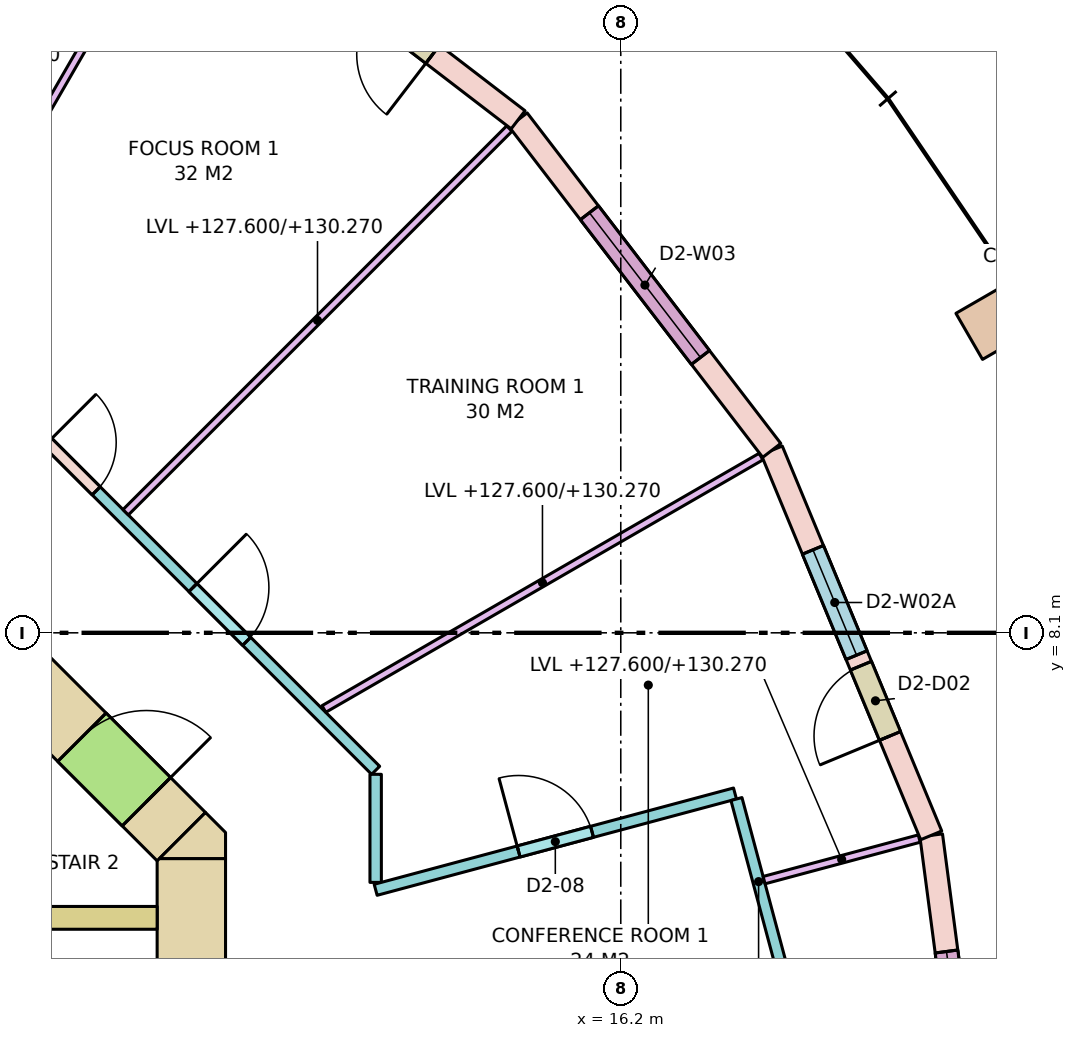
"""IFC4 building model, lengths in metres.
Left out: names, types, materials, properties, quantities, classifications, styles, units other than length and angle.
Written with IfcOpenShell. Run it as: python <this file> out.ifc"""

import sys

from ifc_helpers import new_model, si_unit, direction, frame, frame_2d, origin, origin_2d, place, context, subcontext, project, spatial, polyline, rectangle, outline, extrude, element, fill, save


model = new_model("IFC4")
c1 = context("Model", 3, precision=1e-05, world=origin(), true_north=direction((0.0, 1.0)))
c2 = subcontext(c1, "Body", "Model", "MODEL_VIEW")
j1 = project(units=[si_unit("LENGTHUNIT", "METRE"), si_unit("PLANEANGLEUNIT", "RADIAN")], contexts=[c1])
p1 = place(None, origin())
s1 = spatial("IfcSite", under=j1, at=p1, CompositionType="ELEMENT")
p2 = place(p1, origin())
s2 = spatial("IfcBuilding", under=s1, at=p2, CompositionType="ELEMENT")
p3 = place(p2, frame((0.0, 0.0, 127.6)))
s3 = spatial("IfcBuildingStorey", under=s2, at=p3, CompositionType="ELEMENT", Elevation=127.6)
p4 = place(p3, frame((21.218, 12.25, 0.0), z_axis=(0.0, 0.0, 1.0), x_axis=(-0.5, 0.866025403784, 0.0)))
e1 = element("IfcColumn", 1, at=p4, inside=s3, PredefinedType="COLUMN", context=c2, shape_type="SweptSolid", body=[
    extrude(rectangle(XDim=0.7, YDim=1.0, at=origin_2d()), origin(), (0.0, 0.0, 1.0), 3.8),
])
p5 = place(p3, frame((10.55, -5.13, -0.28), z_axis=(0.0, 0.0, 1.0), x_axis=(0.0, 1.0, 0.0)))
e2 = element("IfcWall", 2, at=p5, inside=s3, PredefinedType="SHEAR", context=c2, shape_type="SweptSolid", body=[
    extrude(rectangle(XDim=10.26, YDim=0.9, at=frame_2d((5.13, 0.0))), origin(), (0.0, 0.0, 1.0), 3.8),
])
p6 = place(p5, frame((4.13, 0.0, 0.28)))
e3 = element("IfcOpeningElement", 3, at=p6, cuts=e2, PredefinedType="OPENING", context=c2, shape_type="SweptSolid", body=[
    extrude(rectangle(XDim=2.0, YDim=2.1, at=frame_2d((1.0, 1.05))), frame((0.0, 0.46, 0.0), z_axis=(0.0, -1.0, 0.0), x_axis=(1.0, 0.0, 0.0)), (0.0, 0.0, 1.0), 0.92),
])
p7 = place(p3, frame((7.418, 8.418, -0.28), z_axis=(0.0, 0.0, 1.0), x_axis=(0.707106781187, -0.707106781187, 0.0)))
e4 = element("IfcWall", 4, at=p7, inside=s3, PredefinedType="SHEAR", context=c2, shape_type="SweptSolid", body=[
    extrude(rectangle(XDim=4.243, YDim=0.9, at=frame_2d((2.121, 0.0))), origin(), (0.0, 0.0, 1.0), 3.8),
])
p8 = place(p7, frame((2.393, 0.0, 0.28)))
e5 = element("IfcOpeningElement", 5, at=p8, cuts=e4, PredefinedType="OPENING", context=c2, shape_type="SweptSolid", body=[
    extrude(rectangle(XDim=1.2, YDim=2.1, at=frame_2d((0.6, 1.05))), frame((0.0, 0.46, 0.0), z_axis=(0.0, -1.0, 0.0), x_axis=(1.0, 0.0, 0.0)), (0.0, 0.0, 1.0), 0.92),
])
p9 = place(p3, frame((0.0, 0.0, -0.28)))
e6 = element("IfcWall", 6, at=p9, inside=s3, PredefinedType="SHEAR", context=c2, shape_type="SweptSolid", body=[
    extrude(outline(polyline([(11.0, 5.473), (11.0, 5.13), (10.13, 5.13), (10.736, 5.736), (11.0, 5.473)])), origin(), (0.0, 0.0, 1.0), 3.8),
])
p10 = place(p3, frame((2.0, 4.35, 0.0), z_axis=(0.0, 0.0, 1.0), x_axis=(1.0, 0.0, 0.0)))
e7 = element("IfcWall", 7, at=p10, inside=s3, PredefinedType="SOLIDWALL", context=c2, shape_type="SweptSolid", body=[
    extrude(rectangle(XDim=8.1, YDim=0.3, at=frame_2d((4.05, 0.0))), origin(), (0.0, 0.0, 1.0), 3.52),
])
p11 = place(p3, frame((21.0, 0.0, 0.0), z_axis=(0.0, 0.0, 1.0), x_axis=(-0.130527087244, 0.991444743541, 0.0)))
e8 = element("IfcWall", 8, at=p11, inside=s3, PredefinedType="STANDARD", context=c2, shape_type="SweptSolid", body=[
    extrude(rectangle(XDim=5.482, YDim=0.3, at=frame_2d((2.741, 0.0))), origin(), (0.0, 0.0, 1.0), 3.52),
])
p12 = place(p11, frame((1.541, 0.0, 0.8)))
e9 = element("IfcOpeningElement", 9, at=p12, cuts=e8, PredefinedType="OPENING", context=c2, shape_type="SweptSolid", body=[
    extrude(rectangle(XDim=2.4, YDim=2.5, at=frame_2d((1.2, 1.25))), frame((0.0, 0.16, 0.0), z_axis=(0.0, -1.0, 0.0), x_axis=(1.0, 0.0, 0.0)), (0.0, 0.0, 1.0), 0.32),
])
p13 = place(p3, frame((20.284, 5.435, 0.0), z_axis=(0.0, 0.0, 1.0), x_axis=(-0.382688740813, 0.923877333662, 0.0)))
e10 = element("IfcWall", 10, at=p13, inside=s3, PredefinedType="STANDARD", context=c2, shape_type="SweptSolid", body=[
    extrude(rectangle(XDim=5.482, YDim=0.3, at=frame_2d((2.741, 0.0))), origin(), (0.0, 0.0, 1.0), 3.52),
])
p14 = place(p13, frame((1.416, 0.0, 0.0)))
e11 = element("IfcOpeningElement", 11, at=p14, cuts=e10, PredefinedType="OPENING", context=c2, shape_type="SweptSolid", body=[
    extrude(rectangle(XDim=1.0, YDim=2.4, at=frame_2d((0.5, 1.2))), frame((0.0, 0.16, 0.0), z_axis=(0.0, -1.0, 0.0), x_axis=(1.0, 0.0, 0.0)), (0.0, 0.0, 1.0), 0.32),
])
p15 = place(p13, frame((2.566, 0.0, 0.8)))
e12 = element("IfcOpeningElement", 12, at=p15, cuts=e10, PredefinedType="OPENING", context=c2, shape_type="SweptSolid", body=[
    extrude(rectangle(XDim=1.5, YDim=2.5, at=frame_2d((0.75, 1.25))), frame((0.0, 0.16, 0.0), z_axis=(0.0, -1.0, 0.0), x_axis=(1.0, 0.0, 0.0)), (0.0, 0.0, 1.0), 0.32),
])
p16 = place(p3, frame((18.187, 10.5, 0.0), z_axis=(0.0, 0.0, 1.0), x_axis=(-0.608784891166, 0.793335336593, 0.0)))
e13 = element("IfcWall", 13, at=p16, inside=s3, PredefinedType="STANDARD", context=c2, shape_type="SweptSolid", body=[
    extrude(rectangle(XDim=5.482, YDim=0.3, at=frame_2d((2.741, 0.0))), origin(), (0.0, 0.0, 1.0), 3.52),
])
p17 = place(p16, frame((1.541, 0.0, 0.8)))
e14 = element("IfcOpeningElement", 14, at=p17, cuts=e13, PredefinedType="OPENING", context=c2, shape_type="SweptSolid", body=[
    extrude(rectangle(XDim=2.4, YDim=2.5, at=frame_2d((1.2, 1.25))), frame((0.0, 0.16, 0.0), z_axis=(0.0, -1.0, 0.0), x_axis=(1.0, 0.0, 0.0)), (0.0, 0.0, 1.0), 0.32),
])
p18 = place(p3, frame((14.849, 14.849, 0.0), z_axis=(0.0, 0.0, 1.0), x_axis=(-0.793335336593, 0.608784891166, 0.0)))
e15 = element("IfcWall", 15, at=p18, inside=s3, PredefinedType="STANDARD", context=c2, shape_type="SweptSolid", body=[
    extrude(rectangle(XDim=5.482, YDim=0.3, at=frame_2d((2.741, 0.0))), origin(), (0.0, 0.0, 1.0), 3.52),
])
p19 = place(p18, frame((1.416, 0.0, 0.0)))
e16 = element("IfcOpeningElement", 16, at=p19, cuts=e15, PredefinedType="OPENING", context=c2, shape_type="SweptSolid", body=[
    extrude(rectangle(XDim=1.0, YDim=2.4, at=frame_2d((0.5, 1.2))), frame((0.0, 0.16, 0.0), z_axis=(0.0, -1.0, 0.0), x_axis=(1.0, 0.0, 0.0)), (0.0, 0.0, 1.0), 0.32),
])
p20 = place(p18, frame((2.566, 0.0, 0.8)))
e17 = element("IfcOpeningElement", 17, at=p20, cuts=e15, PredefinedType="OPENING", context=c2, shape_type="SweptSolid", body=[
    extrude(rectangle(XDim=1.5, YDim=2.5, at=frame_2d((0.75, 1.25))), frame((0.0, 0.16, 0.0), z_axis=(0.0, -1.0, 0.0), x_axis=(1.0, 0.0, 0.0)), (0.0, 0.0, 1.0), 0.32),
])
p21 = place(p3, frame((8.291, 10.975, 0.0), z_axis=(0.0, 0.0, 1.0), x_axis=(0.707106781187, -0.707106781187, 0.0)))
e18 = element("IfcWall", 18, at=p21, inside=s3, PredefinedType="PARTITIONING", context=c2, shape_type="SweptSolid", body=[
    extrude(rectangle(XDim=6.624, YDim=0.15, at=frame_2d((3.312, 0.0))), origin(), (0.0, 0.0, 1.0), 2.67),
])
p22 = place(p21, frame((3.224, 0.0, 0.0)))
e19 = element("IfcOpeningElement", 19, at=p22, cuts=e18, PredefinedType="OPENING", context=c2, shape_type="SweptSolid", body=[
    extrude(rectangle(XDim=1.0, YDim=2.1, at=frame_2d((0.5, 1.05))), frame((0.0, 0.085, 0.0), z_axis=(0.0, -1.0, 0.0), x_axis=(1.0, 0.0, 0.0)), (0.0, 0.0, 1.0), 0.17),
])
p23 = place(p21, frame((0.524, 0.0, 0.0)))
e20 = element("IfcOpeningElement", 20, at=p23, cuts=e18, PredefinedType="OPENING", context=c2, shape_type="SweptSolid", body=[
    extrude(rectangle(XDim=0.9, YDim=2.1, at=frame_2d((0.45, 1.05))), frame((0.0, 0.085, 0.0), z_axis=(0.0, -1.0, 0.0), x_axis=(1.0, 0.0, 0.0)), (0.0, 0.0, 1.0), 0.17),
])
p24 = place(p3, frame((12.975, 6.238, 0.0), z_axis=(0.0, 0.0, 1.0), x_axis=(0.0, -1.0, 0.0)))
e21 = element("IfcWall", 21, at=p24, inside=s3, PredefinedType="PARTITIONING", context=c2, shape_type="SweptSolid", body=[
    extrude(rectangle(XDim=1.422, YDim=0.15, at=frame_2d((0.711, 0.0))), origin(), (0.0, 0.0, 1.0), 3.52),
])
p25 = place(p3, frame((12.975, 4.719, 0.0), z_axis=(0.0, 0.0, 1.0), x_axis=(0.965920440817, 0.258839143121, 0.0)))
e22 = element("IfcWall", 22, at=p25, inside=s3, PredefinedType="PARTITIONING", context=c2, shape_type="SweptSolid", body=[
    extrude(rectangle(XDim=4.894, YDim=0.15, at=frame_2d((2.447, 0.0))), origin(), (0.0, 0.0, 1.0), 3.52),
])
p26 = place(p25, frame((1.947, 0.0, 0.0)))
e23 = element("IfcOpeningElement", 23, at=p26, cuts=e22, PredefinedType="OPENING", context=c2, shape_type="SweptSolid", body=[
    extrude(rectangle(XDim=1.0, YDim=2.1, at=frame_2d((0.5, 1.05))), frame((0.0, 0.085, 0.0), z_axis=(0.0, -1.0, 0.0), x_axis=(1.0, 0.0, 0.0)), (0.0, 0.0, 1.0), 0.17),
])
p27 = place(p3, frame((17.722, 5.913, 0.0), z_axis=(0.0, 0.0, 1.0), x_axis=(0.25879032241, -0.965933522054, 0.0)))
e24 = element("IfcWall", 24, at=p27, inside=s3, PredefinedType="PARTITIONING", context=c2, shape_type="SweptSolid", body=[
    extrude(rectangle(XDim=2.25, YDim=0.15, at=frame_2d((1.125, 0.0))), origin(), (0.0, 0.0, 1.0), 2.67),
])
p28 = place(p3, frame((18.086, 4.846, 0.0), z_axis=(0.0, 0.0, 1.0), x_axis=(0.965956301772, 0.258705282257, 0.0)))
e25 = element("IfcWall", 25, at=p28, inside=s3, PredefinedType="PARTITIONING", context=c2, shape_type="SweptSolid", body=[
    extrude(rectangle(XDim=2.113, YDim=0.1, at=frame_2d((1.057, 0.0))), origin(), (0.0, 0.0, 1.0), 2.67),
])
p29 = place(p3, frame((12.294, 7.098, 0.0), z_axis=(0.0, 0.0, 1.0), x_axis=(0.866010486135, 0.500025837236, 0.0)))
e26 = element("IfcWall", 26, at=p29, inside=s3, PredefinedType="PARTITIONING", context=c2, shape_type="SweptSolid", body=[
    extrude(rectangle(XDim=6.641, YDim=0.1, at=frame_2d((3.32, 0.0))), origin(), (0.0, 0.0, 1.0), 2.67),
])
p30 = place(p3, frame((9.686, 9.686, 0.0), z_axis=(0.0, 0.0, 1.0), x_axis=(0.707106781187, 0.707106781187, 0.0)))
e27 = element("IfcWall", 27, at=p30, inside=s3, PredefinedType="PARTITIONING", context=c2, shape_type="SweptSolid", body=[
    extrude(rectangle(XDim=7.139, YDim=0.1, at=frame_2d((3.569, 0.0))), origin(), (0.0, 0.0, 1.0), 2.67),
])
p31 = place(p3, frame((6.394, 11.075, 0.0), z_axis=(0.0, 0.0, 1.0), x_axis=(0.500024397361, 0.866011317503, 0.0)))
e28 = element("IfcWall", 28, at=p31, inside=s3, PredefinedType="PARTITIONING", context=c2, shape_type="SweptSolid", body=[
    extrude(rectangle(XDim=8.049, YDim=0.1, at=frame_2d((4.024, 0.0))), origin(), (0.0, 0.0, 1.0), 2.67),
])
p32 = place(p12, origin())
e29 = element("IfcWindow", 29, at=p32, inside=s3, PartitioningType="SINGLE_PANEL", PredefinedType="WINDOW", context=c2, shape_type="SweptSolid", body=[
    extrude(rectangle(XDim=2.4, YDim=2.5, at=frame_2d((1.2, 1.25))), frame((0.0, 0.03, 0.0), z_axis=(0.0, -1.0, 0.0), x_axis=(1.0, 0.0, 0.0)), (0.0, 0.0, 1.0), 0.06),
])
fill(e9, e29)
p33 = place(p14, origin())
e30 = element("IfcDoor", 30, at=p33, inside=s3, OperationType="SINGLE_SWING_LEFT", PredefinedType="DOOR", context=c2, shape_type="SweptSolid", body=[
    extrude(rectangle(XDim=1.0, YDim=2.4, at=frame_2d((0.5, 1.2))), frame((0.0, 0.025, 0.0), z_axis=(0.0, -1.0, 0.0), x_axis=(1.0, 0.0, 0.0)), (0.0, 0.0, 1.0), 0.05),
])
fill(e11, e30)
p34 = place(p15, origin())
e31 = element("IfcWindow", 31, at=p34, inside=s3, PartitioningType="SINGLE_PANEL", PredefinedType="WINDOW", context=c2, shape_type="SweptSolid", body=[
    extrude(rectangle(XDim=1.5, YDim=2.5, at=frame_2d((0.75, 1.25))), frame((0.0, 0.03, 0.0), z_axis=(0.0, -1.0, 0.0), x_axis=(1.0, 0.0, 0.0)), (0.0, 0.0, 1.0), 0.06),
])
fill(e12, e31)
p35 = place(p17, origin())
e32 = element("IfcWindow", 32, at=p35, inside=s3, PartitioningType="SINGLE_PANEL", PredefinedType="WINDOW", context=c2, shape_type="SweptSolid", body=[
    extrude(rectangle(XDim=2.4, YDim=2.5, at=frame_2d((1.2, 1.25))), frame((0.0, 0.03, 0.0), z_axis=(0.0, -1.0, 0.0), x_axis=(1.0, 0.0, 0.0)), (0.0, 0.0, 1.0), 0.06),
])
fill(e14, e32)
p36 = place(p19, origin())
e33 = element("IfcDoor", 33, at=p36, inside=s3, OperationType="SINGLE_SWING_LEFT", PredefinedType="DOOR", context=c2, shape_type="SweptSolid", body=[
    extrude(rectangle(XDim=1.0, YDim=2.4, at=frame_2d((0.5, 1.2))), frame((0.0, 0.025, 0.0), z_axis=(0.0, -1.0, 0.0), x_axis=(1.0, 0.0, 0.0)), (0.0, 0.0, 1.0), 0.05),
])
fill(e16, e33)
p37 = place(p8, origin())
e34 = element("IfcDoor", 34, at=p37, inside=s3, OperationType="SINGLE_SWING_RIGHT", PredefinedType="DOOR", context=c2, shape_type="SweptSolid", body=[
    extrude(rectangle(XDim=1.2, YDim=2.1, at=frame_2d((0.6, 1.05))), frame((0.0, 0.025, 0.0), z_axis=(0.0, -1.0, 0.0), x_axis=(1.0, 0.0, 0.0)), (0.0, 0.0, 1.0), 0.05),
])
fill(e5, e34)
p38 = place(p26, origin())
e35 = element("IfcDoor", 35, at=p38, inside=s3, OperationType="SINGLE_SWING_LEFT", PredefinedType="DOOR", context=c2, shape_type="SweptSolid", body=[
    extrude(rectangle(XDim=1.0, YDim=2.1, at=frame_2d((0.5, 1.05))), frame((0.0, 0.025, 0.0), z_axis=(0.0, -1.0, 0.0), x_axis=(1.0, 0.0, 0.0)), (0.0, 0.0, 1.0), 0.05),
])
fill(e23, e35)
p39 = place(p22, origin())
e36 = element("IfcDoor", 36, at=p39, inside=s3, OperationType="SINGLE_SWING_LEFT", PredefinedType="DOOR", context=c2, shape_type="SweptSolid", body=[
    extrude(rectangle(XDim=1.0, YDim=2.1, at=frame_2d((0.5, 1.05))), frame((0.0, 0.025, 0.0), z_axis=(0.0, -1.0, 0.0), x_axis=(1.0, 0.0, 0.0)), (0.0, 0.0, 1.0), 0.05),
])
fill(e19, e36)
p40 = place(p23, origin())
e37 = element("IfcDoor", 37, at=p40, inside=s3, OperationType="SINGLE_SWING_LEFT", PredefinedType="DOOR", context=c2, shape_type="SweptSolid", body=[
    extrude(rectangle(XDim=0.9, YDim=2.1, at=frame_2d((0.45, 1.05))), frame((0.0, 0.025, 0.0), z_axis=(0.0, -1.0, 0.0), x_axis=(1.0, 0.0, 0.0)), (0.0, 0.0, 1.0), 0.05),
])
fill(e20, e37)
save(model, sys.argv[1])
